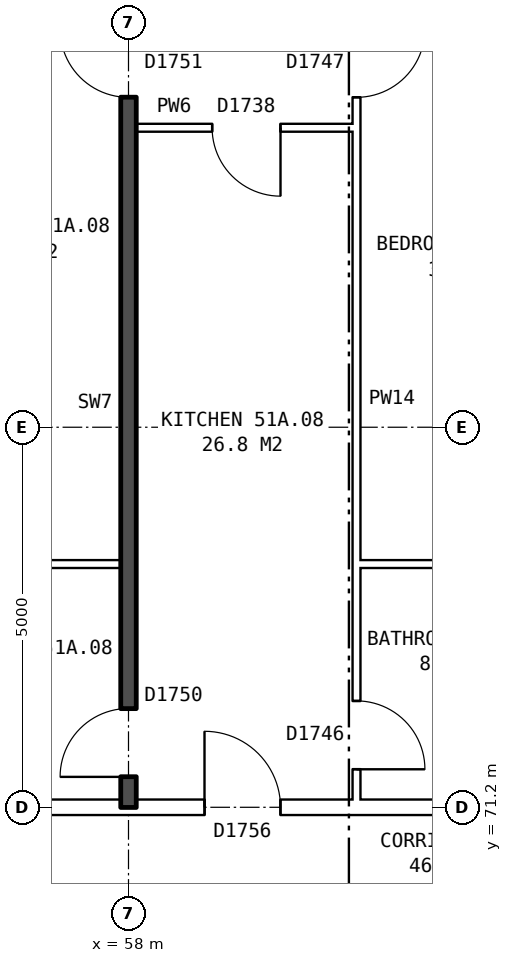
"""IFC4 building model, lengths in metres.
Left out: names, types, materials, properties, quantities, classifications, styles, units other than length and angle.
Written with IfcOpenShell. Run it as: python <this file> out.ifc"""

import sys

from ifc_helpers import new_model, si_unit, direction, frame, frame_2d, origin, place, context, subcontext, project, spatial, rectangle, extrude, element, fill, save


model = new_model("IFC4")
c1 = context("Model", 3, precision=1e-05, world=origin(), true_north=direction((0.0, 1.0)))
c2 = subcontext(c1, "Body", "Model", "MODEL_VIEW")
j1 = project(units=[si_unit("LENGTHUNIT", "METRE"), si_unit("PLANEANGLEUNIT", "RADIAN")], contexts=[c1])
p1 = place(None, origin())
s1 = spatial("IfcSite", under=j1, at=p1, CompositionType="ELEMENT")
p2 = place(p1, origin())
s2 = spatial("IfcBuilding", under=s1, at=p2, CompositionType="ELEMENT")
p3 = place(p2, frame((0.0, 0.0, 182.0)))
s3 = spatial("IfcBuildingStorey", under=s2, at=p3, CompositionType="ELEMENT", Elevation=182.0)
p4 = place(p3, frame((44.36, 71.2, 0.0), z_axis=(0.0, 0.0, 1.0), x_axis=(1.0, 0.0, 0.0)))
e1 = element("IfcWall", 1, at=p4, inside=s3, PredefinedType="PARTITIONING", context=c2, shape_type="SweptSolid", body=[
    extrude(rectangle(XDim=19.28, YDim=0.2, at=frame_2d((9.64, 0.0))), origin(), (0.0, 0.0, 1.0), 2.85),
])
p5 = place(p4, frame((14.64, 0.0, 0.0)))
e2 = element("IfcOpeningElement", 2, at=p5, cuts=e1, PredefinedType="OPENING", context=c2, shape_type="SweptSolid", body=[
    extrude(rectangle(XDim=1.0, YDim=2.1, at=frame_2d((0.5, 1.05))), frame((0.0, 0.11, 0.0), z_axis=(0.0, -1.0, 0.0), x_axis=(1.0, 0.0, 0.0)), (0.0, 0.0, 1.0), 0.22),
])
p6 = place(p4, frame((5.64, 0.0, 0.0)))
e3 = element("IfcOpeningElement", 3, at=p6, cuts=e1, PredefinedType="OPENING", context=c2, shape_type="SweptSolid", body=[
    extrude(rectangle(XDim=1.0, YDim=2.1, at=frame_2d((0.5, 1.05))), frame((0.0, 0.11, 0.0), z_axis=(0.0, -1.0, 0.0), x_axis=(1.0, 0.0, 0.0)), (0.0, 0.0, 1.0), 0.22),
])
p7 = place(p3, frame((55.1, 74.4, 0.0), z_axis=(0.0, 0.0, 1.0), x_axis=(1.0, 0.0, 0.0)))
e4 = element("IfcWall", 4, at=p7, inside=s3, PredefinedType="PARTITIONING", context=c2, shape_type="SweptSolid", body=[
    extrude(rectangle(XDim=2.8, YDim=0.1, at=frame_2d((1.4, 0.0))), origin(), (0.0, 0.0, 1.0), 2.85),
])
p8 = place(p3, frame((61.0, 74.4, 0.0), z_axis=(0.0, 0.0, 1.0), x_axis=(1.0, 0.0, 0.0)))
e5 = element("IfcWall", 5, at=p8, inside=s3, PredefinedType="PARTITIONING", context=c2, shape_type="SweptSolid", body=[
    extrude(rectangle(XDim=2.64, YDim=0.1, at=frame_2d((1.32, 0.0))), origin(), (0.0, 0.0, 1.0), 2.85),
])
p9 = place(p3, frame((58.1, 80.14, 0.0), z_axis=(0.0, 0.0, 1.0), x_axis=(1.0, 0.0, 0.0)))
e6 = element("IfcWall", 6, at=p9, inside=s3, PredefinedType="PARTITIONING", context=c2, shape_type="SweptSolid", body=[
    extrude(rectangle(XDim=2.9, YDim=0.1, at=frame_2d((1.45, 0.0))), origin(), (0.0, 0.0, 1.0), 2.85),
])
p10 = place(p9, frame((1.0, 0.0, 0.0)))
e7 = element("IfcOpeningElement", 7, at=p10, cuts=e6, PredefinedType="OPENING", context=c2, shape_type="SweptSolid", body=[
    extrude(rectangle(XDim=0.9, YDim=2.1, at=frame_2d((0.45, 1.05))), frame((0.0, 0.06, 0.0), z_axis=(0.0, -1.0, 0.0), x_axis=(1.0, 0.0, 0.0)), (0.0, 0.0, 1.0), 0.12),
])
p11 = place(p3, frame((58.0, 71.2, 0.0), z_axis=(0.0, 0.0, 1.0), x_axis=(0.0, 1.0, 0.0)))
e8 = element("IfcWall", 8, at=p11, inside=s3, PredefinedType="SOLIDWALL", context=c2, shape_type="SweptSolid", body=[
    extrude(rectangle(XDim=14.44, YDim=0.2, at=frame_2d((7.22, 0.0))), origin(), (0.0, 0.0, 1.0), 2.85),
])
p12 = place(p11, frame((9.34, 0.0, 0.0)))
e9 = element("IfcOpeningElement", 9, at=p12, cuts=e8, PredefinedType="OPENING", context=c2, shape_type="SweptSolid", body=[
    extrude(rectangle(XDim=0.9, YDim=2.1, at=frame_2d((0.45, 1.05))), frame((0.0, 0.11, 0.0), z_axis=(0.0, -1.0, 0.0), x_axis=(1.0, 0.0, 0.0)), (0.0, 0.0, 1.0), 0.22),
])
p13 = place(p11, frame((0.4, 0.0, 0.0)))
e10 = element("IfcOpeningElement", 10, at=p13, cuts=e8, PredefinedType="OPENING", context=c2, shape_type="SweptSolid", body=[
    extrude(rectangle(XDim=0.9, YDim=2.1, at=frame_2d((0.45, 1.05))), frame((0.0, 0.11, 0.0), z_axis=(0.0, -1.0, 0.0), x_axis=(1.0, 0.0, 0.0)), (0.0, 0.0, 1.0), 0.22),
])
p14 = place(p3, frame((61.0, 71.3, 0.0), z_axis=(0.0, 0.0, 1.0), x_axis=(0.0, 1.0, 0.0)))
e11 = element("IfcWall", 11, at=p14, inside=s3, PredefinedType="PARTITIONING", context=c2, shape_type="SweptSolid", body=[
    extrude(rectangle(XDim=14.34, YDim=0.1, at=frame_2d((7.17, 0.0))), origin(), (0.0, 0.0, 1.0), 2.85),
])
p15 = place(p14, frame((9.24, 0.0, 0.0)))
e12 = element("IfcOpeningElement", 12, at=p15, cuts=e11, PredefinedType="OPENING", context=c2, shape_type="SweptSolid", body=[
    extrude(rectangle(XDim=0.9, YDim=2.1, at=frame_2d((0.45, 1.05))), frame((0.0, 0.06, 0.0), z_axis=(0.0, -1.0, 0.0), x_axis=(1.0, 0.0, 0.0)), (0.0, 0.0, 1.0), 0.12),
])
p16 = place(p14, frame((0.4, 0.0, 0.0)))
e13 = element("IfcOpeningElement", 13, at=p16, cuts=e11, PredefinedType="OPENING", context=c2, shape_type="SweptSolid", body=[
    extrude(rectangle(XDim=0.9, YDim=2.1, at=frame_2d((0.45, 1.05))), frame((0.0, 0.06, 0.0), z_axis=(0.0, -1.0, 0.0), x_axis=(1.0, 0.0, 0.0)), (0.0, 0.0, 1.0), 0.12),
])
p17 = place(p15, frame((0.9, 0.0, 0.0), z_axis=(0.0, 0.0, 1.0), x_axis=(-1.0, 0.0, 0.0)))
e14 = element("IfcDoor", 14, at=p17, inside=s3, OperationType="SINGLE_SWING_LEFT", PredefinedType="DOOR", context=c2, shape_type="SweptSolid", body=[
    extrude(rectangle(XDim=0.9, YDim=2.1, at=frame_2d((0.45, 1.05))), frame((0.0, 0.025, 0.0), z_axis=(0.0, -1.0, 0.0), x_axis=(1.0, 0.0, 0.0)), (0.0, 0.0, 1.0), 0.05),
])
fill(e12, e14)
p18 = place(p12, origin())
e15 = element("IfcDoor", 15, at=p18, inside=s3, OperationType="SINGLE_SWING_RIGHT", PredefinedType="DOOR", context=c2, shape_type="SweptSolid", body=[
    extrude(rectangle(XDim=0.9, YDim=2.1, at=frame_2d((0.45, 1.05))), frame((0.0, 0.025, 0.0), z_axis=(0.0, -1.0, 0.0), x_axis=(1.0, 0.0, 0.0)), (0.0, 0.0, 1.0), 0.05),
])
fill(e9, e15)
p19 = place(p5, origin())
e16 = element("IfcDoor", 16, at=p19, inside=s3, OperationType="SINGLE_SWING_LEFT", PredefinedType="DOOR", context=c2, shape_type="SweptSolid", body=[
    extrude(rectangle(XDim=1.0, YDim=2.1, at=frame_2d((0.5, 1.05))), frame((0.0, 0.025, 0.0), z_axis=(0.0, -1.0, 0.0), x_axis=(1.0, 0.0, 0.0)), (0.0, 0.0, 1.0), 0.05),
])
fill(e2, e16)
p20 = place(p10, frame((0.9, 0.0, 0.0), z_axis=(0.0, 0.0, 1.0), x_axis=(-1.0, 0.0, 0.0)))
e17 = element("IfcDoor", 17, at=p20, inside=s3, OperationType="SINGLE_SWING_LEFT", PredefinedType="DOOR", context=c2, shape_type="SweptSolid", body=[
    extrude(rectangle(XDim=0.9, YDim=2.1, at=frame_2d((0.45, 1.05))), frame((0.0, 0.025, 0.0), z_axis=(0.0, -1.0, 0.0), x_axis=(1.0, 0.0, 0.0)), (0.0, 0.0, 1.0), 0.05),
])
fill(e7, e17)
p21 = place(p16, frame((0.9, 0.0, 0.0), z_axis=(0.0, 0.0, 1.0), x_axis=(-1.0, 0.0, 0.0)))
e18 = element("IfcDoor", 18, at=p21, inside=s3, OperationType="SINGLE_SWING_RIGHT", PredefinedType="DOOR", context=c2, shape_type="SweptSolid", body=[
    extrude(rectangle(XDim=0.9, YDim=2.1, at=frame_2d((0.45, 1.05))), frame((0.0, 0.025, 0.0), z_axis=(0.0, -1.0, 0.0), x_axis=(1.0, 0.0, 0.0)), (0.0, 0.0, 1.0), 0.05),
])
fill(e13, e18)
p22 = place(p13, origin())
e19 = element("IfcDoor", 19, at=p22, inside=s3, OperationType="SINGLE_SWING_LEFT", PredefinedType="DOOR", context=c2, shape_type="SweptSolid", body=[
    extrude(rectangle(XDim=0.9, YDim=2.1, at=frame_2d((0.45, 1.05))), frame((0.0, 0.025, 0.0), z_axis=(0.0, -1.0, 0.0), x_axis=(1.0, 0.0, 0.0)), (0.0, 0.0, 1.0), 0.05),
])
fill(e10, e19)
save(model, sys.argv[1])
